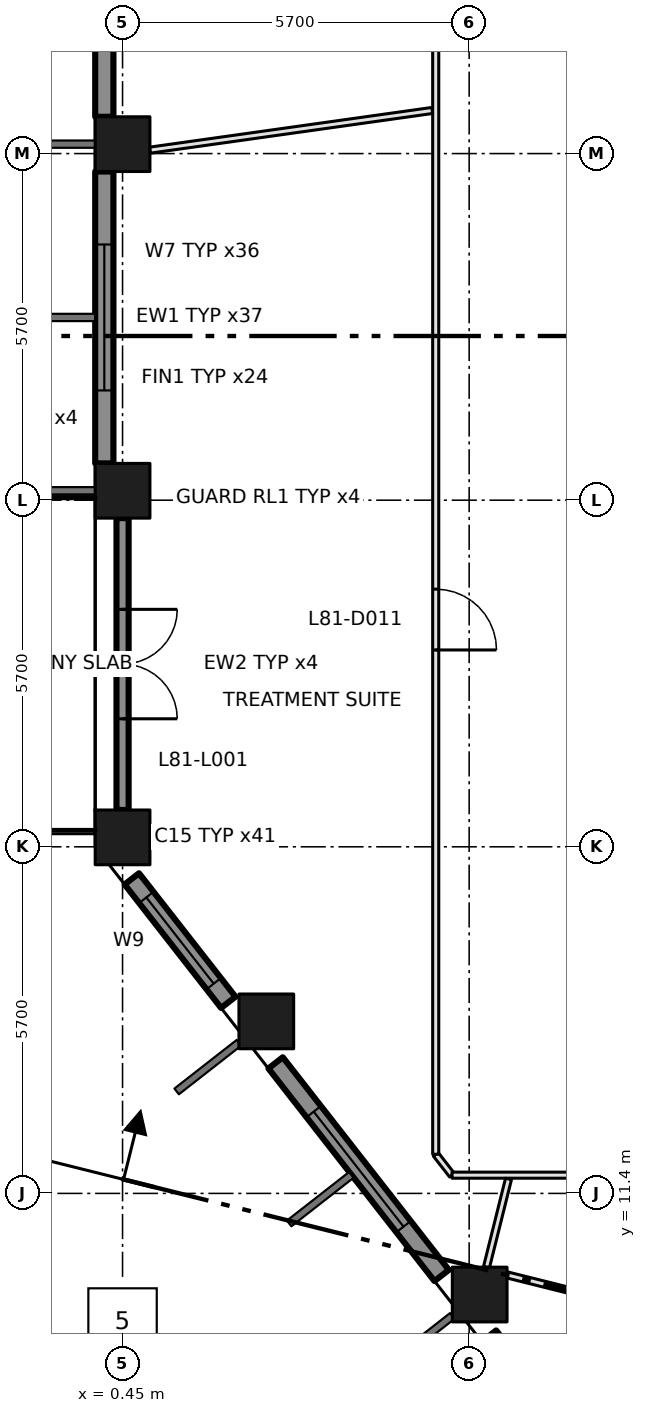
"""IFC4 building model, lengths in metres.
Left out: names, types, materials, properties, quantities, classifications, styles, units other than length and angle.
Written with IfcOpenShell. Run it as: python <this file> out.ifc"""

import sys

from ifc_helpers import new_model, si_unit, direction, frame, frame_2d, origin, origin_2d, place, context, subcontext, project, spatial, rectangle, extrude, element, fill, save


model = new_model("IFC4")
c1 = context("Model", 3, precision=1e-05, world=origin(), true_north=direction((0.0, 1.0)))
c2 = subcontext(c1, "Body", "Model", "MODEL_VIEW")
j1 = project(units=[si_unit("LENGTHUNIT", "METRE"), si_unit("PLANEANGLEUNIT", "RADIAN")], contexts=[c1])
p1 = place(None, origin())
s1 = spatial("IfcSite", under=j1, at=p1, CompositionType="ELEMENT")
p2 = place(p1, origin())
s2 = spatial("IfcBuilding", under=s1, at=p2, CompositionType="ELEMENT")
p3 = place(p2, frame((0.0, 0.0, 354.0)))
s3 = spatial("IfcBuildingStorey", under=s2, at=p3, CompositionType="ELEMENT", Elevation=354.0)
for number, where, z_axis, x_axis in (
    (1, (0.45, 17.255, 0.0), (0.0, 0.0, 1.0), (1.0, 0.0, 0.0)),
    (2, (0.45, 22.955, 0.0), (0.0, 0.0, 1.0), (1.0, 0.0, 0.0)),
    (3, (0.45, 28.655, 0.0), (0.0, 0.0, 1.0), (1.0, 0.0, 0.0)),
    (4, (6.323, 9.737, 0.0), (0.0, 0.0, 1.0), (1.0, 0.0, 0.0)),
    (5, (2.814, 14.229, 0.0), (0.0, 0.0, 1.0), (1.0, 0.0, 0.0)),
):
    element("IfcColumn", number, at=place(p3, frame(where, z_axis=z_axis, x_axis=x_axis)), inside=s3, PredefinedType="COLUMN", context=c2, shape_type="SweptSolid", body=[
        extrude(rectangle(XDim=0.9, YDim=0.9, at=origin_2d()), origin(), (0.0, 0.0, 1.0), 4.2),
    ])
p4 = place(p3, frame((0.15, 33.905, 0.0), z_axis=(0.0, 0.0, 1.0), x_axis=(0.0, -1.0, 0.0)))
e6 = element("IfcWall", 6, at=p4, inside=s3, PredefinedType="SOLIDWALL", context=c2, shape_type="SweptSolid", body=[
    extrude(rectangle(XDim=4.8, YDim=0.3, at=frame_2d((2.4, 0.0))), origin(), (0.0, 0.0, 1.0), 3.2),
])
p5 = place(p4, frame((1.2, 0.0, 0.8)))
e7 = element("IfcOpeningElement", 7, at=p5, cuts=e6, PredefinedType="OPENING", context=c2, shape_type="SweptSolid", body=[
    extrude(rectangle(XDim=2.4, YDim=2.1, at=frame_2d((1.2, 1.05))), frame((0.0, 0.16, 0.0), z_axis=(0.0, -1.0, 0.0), x_axis=(1.0, 0.0, 0.0)), (0.0, 0.0, 1.0), 0.32),
])
p6 = place(p3, frame((0.15, 28.205, 0.0), z_axis=(0.0, 0.0, 1.0), x_axis=(0.0, -1.0, 0.0)))
e8 = element("IfcWall", 8, at=p6, inside=s3, PredefinedType="SOLIDWALL", context=c2, shape_type="SweptSolid", body=[
    extrude(rectangle(XDim=4.8, YDim=0.3, at=frame_2d((2.4, 0.0))), origin(), (0.0, 0.0, 1.0), 3.2),
])
p7 = place(p6, frame((1.2, 0.0, 0.8)))
e9 = element("IfcOpeningElement", 9, at=p7, cuts=e8, PredefinedType="OPENING", context=c2, shape_type="SweptSolid", body=[
    extrude(rectangle(XDim=2.4, YDim=2.1, at=frame_2d((1.2, 1.05))), frame((0.0, 0.16, 0.0), z_axis=(0.0, -1.0, 0.0), x_axis=(1.0, 0.0, 0.0)), (0.0, 0.0, 1.0), 0.32),
])
p8 = place(p3, frame((0.45, 22.505, 0.0), z_axis=(0.0, 0.0, 1.0), x_axis=(0.0, -1.0, 0.0)))
e10 = element("IfcWall", 10, at=p8, inside=s3, PredefinedType="SOLIDWALL", context=c2, shape_type="SweptSolid", body=[
    extrude(rectangle(XDim=4.799, YDim=0.2, at=frame_2d((2.399, 0.0))), origin(), (0.0, 0.0, 1.0), 3.2),
])
p9 = place(p8, frame((1.5, 0.0, 0.0)))
e11 = element("IfcOpeningElement", 11, at=p9, cuts=e10, PredefinedType="OPENING", context=c2, shape_type="SweptSolid", body=[
    extrude(rectangle(XDim=1.8, YDim=2.9, at=frame_2d((0.9, 1.45))), frame((0.0, 0.11, 0.0), z_axis=(0.0, -1.0, 0.0), x_axis=(1.0, 0.0, 0.0)), (0.0, 0.0, 1.0), 0.22),
])
p10 = place(p3, frame((0.602, 16.573, 0.0), z_axis=(0.0, 0.0, 1.0), x_axis=(0.61568999437, -0.787988471256, 0.0)))
e12 = element("IfcWall", 12, at=p10, inside=s3, PredefinedType="SOLIDWALL", context=c2, shape_type="SweptSolid", body=[
    extrude(rectangle(XDim=2.577, YDim=0.3, at=frame_2d((1.289, 0.0))), origin(), (0.0, 0.0, 1.0), 3.2),
])
p11 = place(p10, frame((0.388, 0.0, 0.8)))
e13 = element("IfcOpeningElement", 13, at=p11, cuts=e12, PredefinedType="OPENING", context=c2, shape_type="SweptSolid", body=[
    extrude(rectangle(XDim=1.8, YDim=2.1, at=frame_2d((0.9, 1.05))), frame((0.0, 0.16, 0.0), z_axis=(0.0, -1.0, 0.0), x_axis=(1.0, 0.0, 0.0)), (0.0, 0.0, 1.0), 0.32),
])
p12 = place(p3, frame((2.967, 13.547, 0.0), z_axis=(0.0, 0.0, 1.0), x_axis=(0.615486001463, -0.788147817356, 0.0)))
e14 = element("IfcWall", 14, at=p12, inside=s3, PredefinedType="SOLIDWALL", context=c2, shape_type="SweptSolid", body=[
    extrude(rectangle(XDim=4.437, YDim=0.3, at=frame_2d((2.219, 0.0))), origin(), (0.0, 0.0, 1.0), 3.2),
])
p13 = place(p12, frame((1.018, 0.0, 0.8)))
e15 = element("IfcOpeningElement", 15, at=p13, cuts=e14, PredefinedType="OPENING", context=c2, shape_type="SweptSolid", body=[
    extrude(rectangle(XDim=2.4, YDim=2.1, at=frame_2d((1.2, 1.05))), frame((0.0, 0.16, 0.0), z_axis=(0.0, -1.0, 0.0), x_axis=(1.0, 0.0, 0.0)), (0.0, 0.0, 1.0), 0.32),
])
p14 = place(p3, frame((6.476, 9.055, 0.0), z_axis=(0.0, 0.0, 1.0), x_axis=(0.615649380255, -0.788020203162, 0.0)))
e16 = element("IfcWall", 16, at=p14, inside=s3, PredefinedType="SOLIDWALL", context=c2, shape_type="SweptSolid", body=[
    extrude(rectangle(XDim=4.438, YDim=0.3, at=frame_2d((2.219, 0.0))), origin(), (0.0, 0.0, 1.0), 3.2),
])
p15 = place(p14, frame((1.019, 0.0, 0.8)))
e17 = element("IfcOpeningElement", 17, at=p15, cuts=e16, PredefinedType="OPENING", context=c2, shape_type="SweptSolid", body=[
    extrude(rectangle(XDim=2.4, YDim=2.1, at=frame_2d((1.2, 1.05))), frame((0.0, 0.16, 0.0), z_axis=(0.0, -1.0, 0.0), x_axis=(1.0, 0.0, 0.0)), (0.0, 0.0, 1.0), 0.32),
])
p16 = place(p3, frame((5.6, 12.044, 0.0), z_axis=(0.0, 0.0, 1.0), x_axis=(0.614328236968, -0.789050579661, 0.0)))
e18 = element("IfcWall", 18, at=p16, inside=s3, PredefinedType="PARTITIONING", context=c2, shape_type="SweptSolid", body=[
    extrude(rectangle(XDim=0.436, YDim=0.1, at=frame_2d((0.218, 0.0))), origin(), (0.0, 0.0, 1.0), 3.9),
])
p17 = place(p3, frame((5.6, 39.3, 0.0), z_axis=(0.0, 0.0, 1.0), x_axis=(0.0, -1.0, 0.0)))
e19 = element("IfcWall", 19, at=p17, inside=s3, PredefinedType="PARTITIONING", context=c2, shape_type="SweptSolid", body=[
    extrude(rectangle(XDim=27.256, YDim=0.1, at=frame_2d((13.628, 0.0))), origin(), (0.0, 0.0, 1.0), 3.9),
])
p18 = place(p17, frame((17.963, 0.0, 0.0)))
e20 = element("IfcOpeningElement", 20, at=p18, cuts=e19, PredefinedType="OPENING", context=c2, shape_type="SweptSolid", body=[
    extrude(rectangle(XDim=1.0, YDim=2.1, at=frame_2d((0.5, 1.05))), frame((0.0, 0.06, 0.0), z_axis=(0.0, -1.0, 0.0), x_axis=(1.0, 0.0, 0.0)), (0.0, 0.0, 1.0), 0.12),
])
p19 = place(p3, frame((5.868, 11.7, 0.0), z_axis=(0.0, 0.0, 1.0), x_axis=(1.0, 0.0, 0.0)))
e21 = element("IfcWall", 21, at=p19, inside=s3, PredefinedType="PARTITIONING", context=c2, shape_type="SweptSolid", body=[
    extrude(rectangle(XDim=4.032, YDim=0.1, at=frame_2d((2.016, 0.0))), origin(), (0.0, 0.0, 1.0), 3.9),
])
p20 = place(p3, frame((5.543, 29.209, 0.0), z_axis=(0.0, 0.0, 1.0), x_axis=(-0.990252315106, -0.139285147908, 0.0)))
e22 = element("IfcWall", 22, at=p20, inside=s3, PredefinedType="PARTITIONING", context=c2, shape_type="SweptSolid", body=[
    extrude(rectangle(XDim=4.689, YDim=0.1, at=frame_2d((2.344, 0.0))), origin(), (0.0, 0.0, 1.0), 3.9),
])
p21 = place(p3, frame((6.797, 11.638, 0.0), z_axis=(0.0, 0.0, 1.0), x_axis=(-0.242113049408, -0.970248046278, 0.0)))
e23 = element("IfcWall", 23, at=p21, inside=s3, PredefinedType="PARTITIONING", context=c2, shape_type="SweptSolid", body=[
    extrude(rectangle(XDim=1.495, YDim=0.1, at=frame_2d((0.748, 0.0))), origin(), (0.0, 0.0, 1.0), 3.9),
])
p22 = place(p3, frame((8.72, 9.574, 0.0), z_axis=(0.0, 0.0, 1.0), x_axis=(-0.970221168815, 0.24222073318, 0.0)))
e24 = element("IfcWall", 24, at=p22, inside=s3, PredefinedType="PARTITIONING", context=c2, shape_type="SweptSolid", body=[
    extrude(rectangle(XDim=2.007, YDim=0.1, at=frame_2d((1.003, 0.0))), origin(), (0.0, 0.0, 1.0), 3.9),
])
p23 = place(p7, origin())
e25 = element("IfcWindow", 25, at=p23, inside=s3, PartitioningType="DOUBLE_PANEL_VERTICAL", PredefinedType="WINDOW", context=c2, shape_type="SweptSolid", body=[
    extrude(rectangle(XDim=2.4, YDim=2.1, at=frame_2d((1.2, 1.05))), frame((0.0, 0.03, 0.0), z_axis=(0.0, -1.0, 0.0), x_axis=(1.0, 0.0, 0.0)), (0.0, 0.0, 1.0), 0.06),
])
fill(e9, e25)
p24 = place(p9, origin())
e26 = element("IfcDoor", 26, at=p24, inside=s3, OperationType="DOUBLE_DOOR_SINGLE_SWING", PredefinedType="DOOR", context=c2, shape_type="SweptSolid", body=[
    extrude(rectangle(XDim=1.8, YDim=2.9, at=frame_2d((0.9, 1.45))), frame((0.0, 0.025, 0.0), z_axis=(0.0, -1.0, 0.0), x_axis=(1.0, 0.0, 0.0)), (0.0, 0.0, 1.0), 0.05),
])
fill(e11, e26)
p25 = place(p11, origin())
e27 = element("IfcWindow", 27, at=p25, inside=s3, PartitioningType="DOUBLE_PANEL_VERTICAL", PredefinedType="WINDOW", context=c2, shape_type="SweptSolid", body=[
    extrude(rectangle(XDim=1.8, YDim=2.1, at=frame_2d((0.9, 1.05))), frame((0.0, 0.03, 0.0), z_axis=(0.0, -1.0, 0.0), x_axis=(1.0, 0.0, 0.0)), (0.0, 0.0, 1.0), 0.06),
])
fill(e13, e27)
p26 = place(p13, origin())
e28 = element("IfcWindow", 28, at=p26, inside=s3, PartitioningType="DOUBLE_PANEL_VERTICAL", PredefinedType="WINDOW", context=c2, shape_type="SweptSolid", body=[
    extrude(rectangle(XDim=2.4, YDim=2.1, at=frame_2d((1.2, 1.05))), frame((0.0, 0.03, 0.0), z_axis=(0.0, -1.0, 0.0), x_axis=(1.0, 0.0, 0.0)), (0.0, 0.0, 1.0), 0.06),
])
fill(e15, e28)
p27 = place(p18, origin())
e29 = element("IfcDoor", 29, at=p27, inside=s3, OperationType="SINGLE_SWING_RIGHT", PredefinedType="DOOR", context=c2, shape_type="SweptSolid", body=[
    extrude(rectangle(XDim=1.0, YDim=2.1, at=frame_2d((0.5, 1.05))), frame((0.0, 0.025, 0.0), z_axis=(0.0, -1.0, 0.0), x_axis=(1.0, 0.0, 0.0)), (0.0, 0.0, 1.0), 0.05),
])
fill(e20, e29)
save(model, sys.argv[1])
